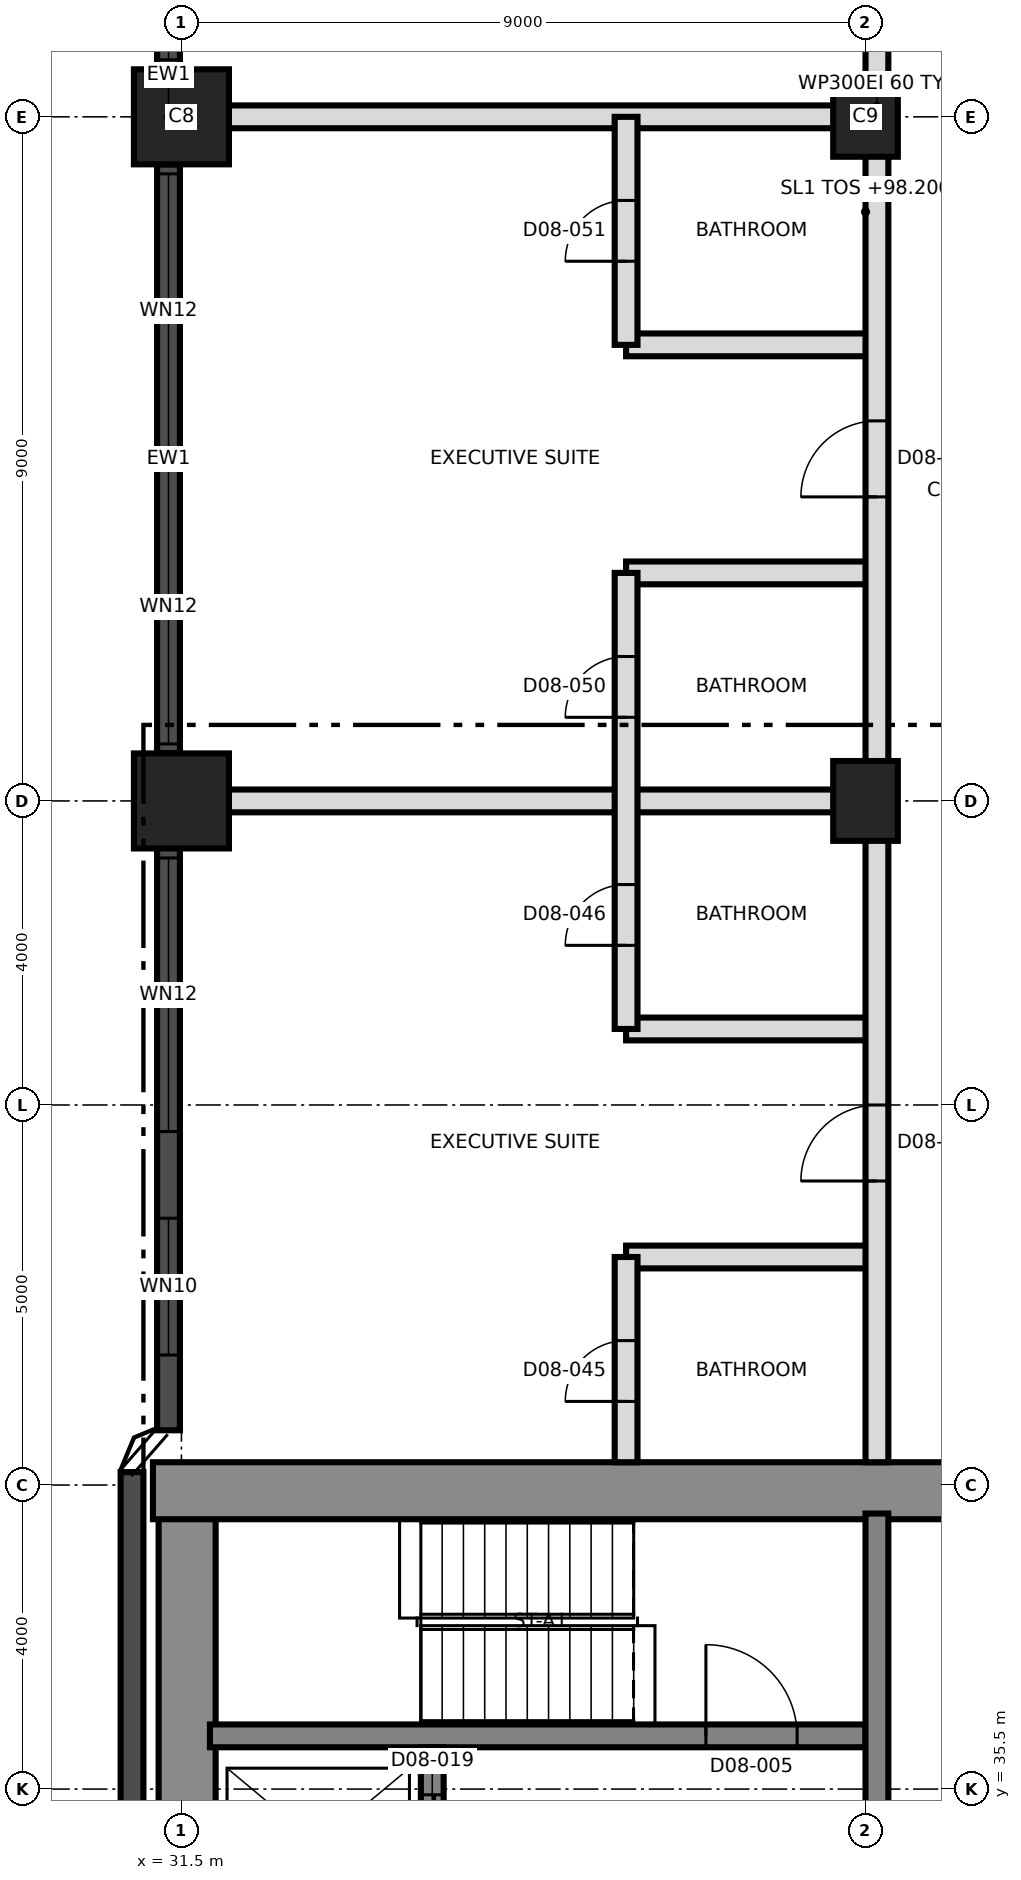
"""IFC4 building model, lengths in metres.
Left out: names, types, materials, properties, quantities, classifications, styles, units other than length and angle.
Written with IfcOpenShell. Run it as: python <this file> out.ifc"""

import sys

from ifc_helpers import new_model, si_unit, direction, frame, frame_2d, origin, origin_2d, place, context, subcontext, project, spatial, rectangle, extrude, element, fill, save


model = new_model("IFC4")
c1 = context("Model", 3, precision=1e-05, world=origin(), true_north=direction((0.0, 1.0)))
c2 = subcontext(c1, "Body", "Model", "MODEL_VIEW")
j1 = project(units=[si_unit("LENGTHUNIT", "METRE"), si_unit("PLANEANGLEUNIT", "RADIAN")], contexts=[c1])
p1 = place(None, origin())
s1 = spatial("IfcSite", under=j1, at=p1, CompositionType="ELEMENT")
p2 = place(p1, origin())
s2 = spatial("IfcBuilding", under=s1, at=p2, CompositionType="ELEMENT")
p3 = place(p2, frame((0.0, 0.0, 98.2)))
s3 = spatial("IfcBuildingStorey", under=s2, at=p3, CompositionType="ELEMENT", Elevation=98.2)
p4 = place(p3, frame((31.575, 21.875, 0.0), z_axis=(0.0, 0.0, 1.0), x_axis=(0.0, 1.0, 0.0)))
e1 = element("IfcWall", 1, at=p4, inside=s3, PredefinedType="SHEAR", context=c2, shape_type="SweptSolid", body=[
    extrude(rectangle(XDim=17.25, YDim=0.75, at=frame_2d((8.625, 0.0))), origin(), (0.0, 0.0, 1.0), 3.7),
])
p5 = place(p3, frame((31.125, 39.425, 0.0), z_axis=(0.0, 0.0, 1.0), x_axis=(1.0, 0.0, 0.0)))
e2 = element("IfcWall", 2, at=p5, inside=s3, PredefinedType="SHEAR", context=c2, shape_type="SweptSolid", body=[
    extrude(rectangle(XDim=27.0, YDim=0.75, at=frame_2d((13.5, 0.0))), origin(), (0.0, 0.0, 1.0), 3.7),
])
p6 = place(p5, frame((10.575, 0.0, 0.0)))
e3 = element("IfcOpeningElement", 3, at=p6, cuts=e2, PredefinedType="OPENING", context=c2, shape_type="SweptSolid", body=[
    extrude(rectangle(XDim=1.2, YDim=2.1, at=frame_2d((0.6, 1.05))), frame((0.0, 0.385, 0.0), z_axis=(0.0, -1.0, 0.0), x_axis=(1.0, 0.0, 0.0)), (0.0, 0.0, 1.0), 0.77),
])
p7 = place(p3, frame((31.875, 36.2, 0.0), z_axis=(0.0, 0.0, 1.0), x_axis=(1.0, 0.0, 0.0)))
e4 = element("IfcWall", 4, at=p7, inside=s3, PredefinedType="SHEAR", context=c2, shape_type="SweptSolid", body=[
    extrude(rectangle(XDim=8.625, YDim=0.3, at=frame_2d((4.312, 0.0))), origin(), (0.0, 0.0, 1.0), 3.7),
])
p8 = place(p7, frame((6.525, 0.0, 0.0)))
e5 = element("IfcOpeningElement", 5, at=p8, cuts=e4, PredefinedType="OPENING", context=c2, shape_type="SweptSolid", body=[
    extrude(rectangle(XDim=1.2, YDim=2.1, at=frame_2d((0.6, 1.05))), frame((0.0, 0.16, 0.0), z_axis=(0.0, -1.0, 0.0), x_axis=(1.0, 0.0, 0.0)), (0.0, 0.0, 1.0), 0.32),
])
p9 = place(p3, frame((40.65, 33.5, 0.0), z_axis=(0.0, 0.0, 1.0), x_axis=(0.0, 1.0, 0.0)))
e6 = element("IfcWall", 6, at=p9, inside=s3, PredefinedType="SHEAR", context=c2, shape_type="SweptSolid", body=[
    extrude(rectangle(XDim=5.625, YDim=0.3, at=frame_2d((2.812, 0.0))), origin(), (0.0, 0.0, 1.0), 3.7),
])
p10 = place(p3, frame((34.8, 33.5, 0.0), z_axis=(0.0, 0.0, 1.0), x_axis=(0.0, 1.0, 0.0)))
e7 = element("IfcWall", 7, at=p10, inside=s3, PredefinedType="SHEAR", context=c2, shape_type="SweptSolid", body=[
    extrude(rectangle(XDim=2.55, YDim=0.3, at=frame_2d((1.275, 0.0))), origin(), (0.0, 0.0, 1.0), 3.7),
])
p11 = place(p10, frame((0.625, 0.0, 0.0)))
e8 = element("IfcOpeningElement", 8, at=p11, cuts=e7, PredefinedType="OPENING", context=c2, shape_type="SweptSolid", body=[
    extrude(rectangle(XDim=1.3, YDim=2.4, at=frame_2d((0.65, 1.2))), frame((0.0, 0.16, 0.0), z_axis=(0.0, -1.0, 0.0), x_axis=(1.0, 0.0, 0.0)), (0.0, 0.0, 1.0), 0.32),
])
p12 = place(p3, frame((31.5, 48.5, 0.0), z_axis=(0.0, 0.0, 1.0), x_axis=(1.0, 0.0, 0.0)))
e9 = element("IfcColumn", 9, at=p12, inside=s3, PredefinedType="COLUMN", context=c2, shape_type="SweptSolid", body=[
    extrude(rectangle(XDim=1.25, YDim=1.25, at=origin_2d()), origin(), (0.0, 0.0, 1.0), 3.7),
])
p13 = place(p3, frame((40.5, 48.5, 0.0), z_axis=(0.0, 0.0, 1.0), x_axis=(0.0, 1.0, 0.0)))
e10 = element("IfcColumn", 10, at=p13, inside=s3, PredefinedType="COLUMN", context=c2, shape_type="SweptSolid", body=[
    extrude(rectangle(XDim=1.05, YDim=0.85, at=origin_2d()), origin(), (0.0, 0.0, 1.0), 3.7),
])
p14 = place(p3, frame((31.5, 57.5, 0.0), z_axis=(0.0, 0.0, 1.0), x_axis=(1.0, 0.0, 0.0)))
e11 = element("IfcColumn", 11, at=p14, inside=s3, PredefinedType="COLUMN", context=c2, shape_type="SweptSolid", body=[
    extrude(rectangle(XDim=1.25, YDim=1.25, at=origin_2d()), origin(), (0.0, 0.0, 1.0), 3.7),
])
p15 = place(p3, frame((40.5, 57.5, 0.0), z_axis=(0.0, 0.0, 1.0), x_axis=(0.0, 1.0, 0.0)))
e12 = element("IfcColumn", 12, at=p15, inside=s3, PredefinedType="COLUMN", context=c2, shape_type="SweptSolid", body=[
    extrude(rectangle(XDim=1.05, YDim=0.85, at=origin_2d()), origin(), (0.0, 0.0, 1.0), 3.7),
])
p16 = place(p3, frame((31.33, 65.875, 0.0), z_axis=(0.0, 0.0, 1.0), x_axis=(0.0, -1.0, 0.0)))
e13 = element("IfcWall", 13, at=p16, inside=s3, PredefinedType="SOLIDWALL", context=c2, shape_type="SweptSolid", body=[
    extrude(rectangle(XDim=7.75, YDim=0.3, at=frame_2d((3.875, 0.0))), origin(), (0.0, 0.0, 1.0), 2.75),
])
p17 = place(p16, frame((4.025, 0.0, 0.9)))
e14 = element("IfcOpeningElement", 14, at=p17, cuts=e13, PredefinedType="OPENING", context=c2, shape_type="SweptSolid", body=[
    extrude(rectangle(XDim=3.6, YDim=1.5, at=frame_2d((1.8, 0.75))), frame((0.0, 0.16, 0.0), z_axis=(0.0, -1.0, 0.0), x_axis=(1.0, 0.0, 0.0)), (0.0, 0.0, 1.0), 0.32),
])
p18 = place(p3, frame((31.33, 58.125, 0.0), z_axis=(0.0, 0.0, 1.0), x_axis=(0.0, -1.0, 0.0)))
e15 = element("IfcWall", 15, at=p18, inside=s3, PredefinedType="SOLIDWALL", context=c2, shape_type="SweptSolid", body=[
    extrude(rectangle(XDim=1.25, YDim=0.3, at=frame_2d((0.625, 0.0))), origin(), (0.0, 0.0, 1.0), 3.4),
])
p19 = place(p3, frame((31.33, 56.875, 0.0), z_axis=(0.0, 0.0, 1.0), x_axis=(0.0, -1.0, 0.0)))
e16 = element("IfcWall", 16, at=p19, inside=s3, PredefinedType="SOLIDWALL", context=c2, shape_type="SweptSolid", body=[
    extrude(rectangle(XDim=7.75, YDim=0.3, at=frame_2d((3.875, 0.0))), origin(), (0.0, 0.0, 1.0), 2.75),
])
p20 = place(p19, frame((0.125, 0.0, 0.9)))
e17 = element("IfcOpeningElement", 17, at=p20, cuts=e16, PredefinedType="OPENING", context=c2, shape_type="SweptSolid", body=[
    extrude(rectangle(XDim=3.6, YDim=1.5, at=frame_2d((1.8, 0.75))), frame((0.0, 0.16, 0.0), z_axis=(0.0, -1.0, 0.0), x_axis=(1.0, 0.0, 0.0)), (0.0, 0.0, 1.0), 0.32),
])
p21 = place(p19, frame((4.025, 0.0, 0.9)))
e18 = element("IfcOpeningElement", 18, at=p21, cuts=e16, PredefinedType="OPENING", context=c2, shape_type="SweptSolid", body=[
    extrude(rectangle(XDim=3.6, YDim=1.5, at=frame_2d((1.8, 0.75))), frame((0.0, 0.16, 0.0), z_axis=(0.0, -1.0, 0.0), x_axis=(1.0, 0.0, 0.0)), (0.0, 0.0, 1.0), 0.32),
])
p22 = place(p3, frame((31.33, 49.125, 0.0), z_axis=(0.0, 0.0, 1.0), x_axis=(0.0, -1.0, 0.0)))
e19 = element("IfcWall", 19, at=p22, inside=s3, PredefinedType="SOLIDWALL", context=c2, shape_type="SweptSolid", body=[
    extrude(rectangle(XDim=8.905, YDim=0.3, at=frame_2d((4.452, 0.0))), origin(), (0.0, 0.0, 1.0), 3.4),
])
p23 = place(p22, frame((1.375, 0.0, 0.9)))
e20 = element("IfcOpeningElement", 20, at=p23, cuts=e19, PredefinedType="OPENING", context=c2, shape_type="SweptSolid", body=[
    extrude(rectangle(XDim=3.6, YDim=1.5, at=frame_2d((1.8, 0.75))), frame((0.0, 0.16, 0.0), z_axis=(0.0, -1.0, 0.0), x_axis=(1.0, 0.0, 0.0)), (0.0, 0.0, 1.0), 0.32),
])
p24 = place(p22, frame((6.115, 0.0, 0.3)))
e21 = element("IfcOpeningElement", 21, at=p24, cuts=e19, PredefinedType="OPENING", context=c2, shape_type="SweptSolid", body=[
    extrude(rectangle(XDim=1.8, YDim=2.4, at=frame_2d((0.9, 1.2))), frame((0.0, 0.16, 0.0), z_axis=(0.0, -1.0, 0.0), x_axis=(1.0, 0.0, 0.0)), (0.0, 0.0, 1.0), 0.32),
])
p25 = place(p3, frame((30.85, 39.67, 0.0), z_axis=(0.0, 0.0, 1.0), x_axis=(0.0, -1.0, 0.0)))
e22 = element("IfcWall", 22, at=p25, inside=s3, PredefinedType="SOLIDWALL", context=c2, shape_type="SweptSolid", body=[
    extrude(rectangle(XDim=18.31, YDim=0.3, at=frame_2d((9.155, 0.0))), origin(), (0.0, 0.0, 1.0), 3.4),
])
for number, where, z_axis, x_axis in (
    (23, (37.35, 42.5, 0.0), (0.0, 0.0, 1.0), (1.0, 0.0, 0.0)),
    (24, (37.35, 45.5, 0.0), (0.0, 0.0, 1.0), (1.0, 0.0, 0.0)),
):
    element("IfcWall", number, at=place(p3, frame(where, z_axis=z_axis, x_axis=x_axis)), inside=s3, PredefinedType="PARTITIONING", context=c2, shape_type="SweptSolid", body=[
        extrude(rectangle(XDim=3.3, YDim=0.3, at=frame_2d((1.65, 0.0))), origin(), (0.0, 0.0, 1.0), 3.4),
    ])
p26 = place(p3, frame((31.53, 48.5, 0.0), z_axis=(0.0, 0.0, 1.0), x_axis=(1.0, 0.0, 0.0)))
e25 = element("IfcWall", 25, at=p26, inside=s3, PredefinedType="PARTITIONING", context=c2, shape_type="SweptSolid", body=[
    extrude(rectangle(XDim=9.12, YDim=0.3, at=frame_2d((4.56, 0.0))), origin(), (0.0, 0.0, 1.0), 3.4),
])
for number, where, z_axis, x_axis in (
    (26, (37.35, 51.5, 0.0), (0.0, 0.0, 1.0), (1.0, 0.0, 0.0)),
    (27, (37.35, 54.5, 0.0), (0.0, 0.0, 1.0), (1.0, 0.0, 0.0)),
):
    element("IfcWall", number, at=place(p3, frame(where, z_axis=z_axis, x_axis=x_axis)), inside=s3, PredefinedType="PARTITIONING", context=c2, shape_type="SweptSolid", body=[
        extrude(rectangle(XDim=3.3, YDim=0.3, at=frame_2d((1.65, 0.0))), origin(), (0.0, 0.0, 1.0), 3.4),
    ])
p27 = place(p3, frame((31.53, 57.5, 0.0), z_axis=(0.0, 0.0, 1.0), x_axis=(1.0, 0.0, 0.0)))
e28 = element("IfcWall", 28, at=p27, inside=s3, PredefinedType="PARTITIONING", context=c2, shape_type="SweptSolid", body=[
    extrude(rectangle(XDim=9.12, YDim=0.3, at=frame_2d((4.56, 0.0))), origin(), (0.0, 0.0, 1.0), 3.4),
])
p28 = place(p3, frame((37.35, 39.8, 0.0), z_axis=(0.0, 0.0, 1.0), x_axis=(0.0, 1.0, 0.0)))
e29 = element("IfcWall", 29, at=p28, inside=s3, PredefinedType="PARTITIONING", context=c2, shape_type="SweptSolid", body=[
    extrude(rectangle(XDim=2.7, YDim=0.3, at=frame_2d((1.35, 0.0))), origin(), (0.0, 0.0, 1.0), 3.4),
])
p29 = place(p28, frame((0.8, 0.0, 0.0)))
e30 = element("IfcOpeningElement", 30, at=p29, cuts=e29, PredefinedType="OPENING", context=c2, shape_type="SweptSolid", body=[
    extrude(rectangle(XDim=0.8, YDim=2.1, at=frame_2d((0.4, 1.05))), frame((0.0, 0.16, 0.0), z_axis=(0.0, -1.0, 0.0), x_axis=(1.0, 0.0, 0.0)), (0.0, 0.0, 1.0), 0.32),
])
p30 = place(p3, frame((37.35, 45.5, 0.0), z_axis=(0.0, 0.0, 1.0), x_axis=(0.0, 1.0, 0.0)))
e31 = element("IfcWall", 31, at=p30, inside=s3, PredefinedType="PARTITIONING", context=c2, shape_type="SweptSolid", body=[
    extrude(rectangle(XDim=6.0, YDim=0.3, at=frame_2d((3.0, 0.0))), origin(), (0.0, 0.0, 1.0), 3.4),
])
p31 = place(p30, frame((1.1, 0.0, 0.0)))
e32 = element("IfcOpeningElement", 32, at=p31, cuts=e31, PredefinedType="OPENING", context=c2, shape_type="SweptSolid", body=[
    extrude(rectangle(XDim=0.8, YDim=2.1, at=frame_2d((0.4, 1.05))), frame((0.0, 0.16, 0.0), z_axis=(0.0, -1.0, 0.0), x_axis=(1.0, 0.0, 0.0)), (0.0, 0.0, 1.0), 0.32),
])
p32 = place(p30, frame((4.1, 0.0, 0.0)))
e33 = element("IfcOpeningElement", 33, at=p32, cuts=e31, PredefinedType="OPENING", context=c2, shape_type="SweptSolid", body=[
    extrude(rectangle(XDim=0.8, YDim=2.1, at=frame_2d((0.4, 1.05))), frame((0.0, 0.16, 0.0), z_axis=(0.0, -1.0, 0.0), x_axis=(1.0, 0.0, 0.0)), (0.0, 0.0, 1.0), 0.32),
])
p33 = place(p3, frame((37.35, 54.5, 0.0), z_axis=(0.0, 0.0, 1.0), x_axis=(0.0, 1.0, 0.0)))
e34 = element("IfcWall", 34, at=p33, inside=s3, PredefinedType="PARTITIONING", context=c2, shape_type="SweptSolid", body=[
    extrude(rectangle(XDim=3.0, YDim=0.3, at=frame_2d((1.5, 0.0))), origin(), (0.0, 0.0, 1.0), 3.4),
])
p34 = place(p33, frame((1.1, 0.0, 0.0)))
e35 = element("IfcOpeningElement", 35, at=p34, cuts=e34, PredefinedType="OPENING", context=c2, shape_type="SweptSolid", body=[
    extrude(rectangle(XDim=0.8, YDim=2.1, at=frame_2d((0.4, 1.05))), frame((0.0, 0.16, 0.0), z_axis=(0.0, -1.0, 0.0), x_axis=(1.0, 0.0, 0.0)), (0.0, 0.0, 1.0), 0.32),
])
p35 = place(p3, frame((40.65, 39.8, 0.0), z_axis=(0.0, 0.0, 1.0), x_axis=(0.0, 1.0, 0.0)))
e36 = element("IfcWall", 36, at=p35, inside=s3, PredefinedType="PARTITIONING", context=c2, shape_type="SweptSolid", body=[
    extrude(rectangle(XDim=35.67, YDim=0.3, at=frame_2d((17.835, 0.0))), origin(), (0.0, 0.0, 1.0), 3.4),
])
p36 = place(p35, frame((3.7, 0.0, 0.0)))
e37 = element("IfcOpeningElement", 37, at=p36, cuts=e36, PredefinedType="OPENING", context=c2, shape_type="SweptSolid", body=[
    extrude(rectangle(XDim=1.0, YDim=2.4, at=frame_2d((0.5, 1.2))), frame((0.0, 0.16, 0.0), z_axis=(0.0, -1.0, 0.0), x_axis=(1.0, 0.0, 0.0)), (0.0, 0.0, 1.0), 0.32),
])
p37 = place(p35, frame((12.7, 0.0, 0.0)))
e38 = element("IfcOpeningElement", 38, at=p37, cuts=e36, PredefinedType="OPENING", context=c2, shape_type="SweptSolid", body=[
    extrude(rectangle(XDim=1.0, YDim=2.4, at=frame_2d((0.5, 1.2))), frame((0.0, 0.16, 0.0), z_axis=(0.0, -1.0, 0.0), x_axis=(1.0, 0.0, 0.0)), (0.0, 0.0, 1.0), 0.32),
])
p38 = place(p35, frame((21.2, 0.0, 0.0)))
e39 = element("IfcOpeningElement", 39, at=p38, cuts=e36, PredefinedType="OPENING", context=c2, shape_type="SweptSolid", body=[
    extrude(rectangle(XDim=1.0, YDim=2.4, at=frame_2d((0.5, 1.2))), frame((0.0, 0.16, 0.0), z_axis=(0.0, -1.0, 0.0), x_axis=(1.0, 0.0, 0.0)), (0.0, 0.0, 1.0), 0.32),
])
p39 = place(p17, origin())
e40 = element("IfcWindow", 40, at=p39, inside=s3, PartitioningType="SINGLE_PANEL", PredefinedType="WINDOW", context=c2, shape_type="SweptSolid", body=[
    extrude(rectangle(XDim=3.6, YDim=1.5, at=frame_2d((1.8, 0.75))), frame((0.0, 0.03, 0.0), z_axis=(0.0, -1.0, 0.0), x_axis=(1.0, 0.0, 0.0)), (0.0, 0.0, 1.0), 0.06),
])
fill(e14, e40)
p40 = place(p20, origin())
e41 = element("IfcWindow", 41, at=p40, inside=s3, PartitioningType="SINGLE_PANEL", PredefinedType="WINDOW", context=c2, shape_type="SweptSolid", body=[
    extrude(rectangle(XDim=3.6, YDim=1.5, at=frame_2d((1.8, 0.75))), frame((0.0, 0.03, 0.0), z_axis=(0.0, -1.0, 0.0), x_axis=(1.0, 0.0, 0.0)), (0.0, 0.0, 1.0), 0.06),
])
fill(e17, e41)
p41 = place(p21, origin())
e42 = element("IfcWindow", 42, at=p41, inside=s3, PartitioningType="SINGLE_PANEL", PredefinedType="WINDOW", context=c2, shape_type="SweptSolid", body=[
    extrude(rectangle(XDim=3.6, YDim=1.5, at=frame_2d((1.8, 0.75))), frame((0.0, 0.03, 0.0), z_axis=(0.0, -1.0, 0.0), x_axis=(1.0, 0.0, 0.0)), (0.0, 0.0, 1.0), 0.06),
])
fill(e18, e42)
p42 = place(p23, origin())
e43 = element("IfcWindow", 43, at=p42, inside=s3, PartitioningType="SINGLE_PANEL", PredefinedType="WINDOW", context=c2, shape_type="SweptSolid", body=[
    extrude(rectangle(XDim=3.6, YDim=1.5, at=frame_2d((1.8, 0.75))), frame((0.0, 0.03, 0.0), z_axis=(0.0, -1.0, 0.0), x_axis=(1.0, 0.0, 0.0)), (0.0, 0.0, 1.0), 0.06),
])
fill(e20, e43)
p43 = place(p24, origin())
e44 = element("IfcWindow", 44, at=p43, inside=s3, PartitioningType="SINGLE_PANEL", PredefinedType="WINDOW", context=c2, shape_type="SweptSolid", body=[
    extrude(rectangle(XDim=1.8, YDim=2.4, at=frame_2d((0.9, 1.2))), frame((0.0, 0.03, 0.0), z_axis=(0.0, -1.0, 0.0), x_axis=(1.0, 0.0, 0.0)), (0.0, 0.0, 1.0), 0.06),
])
fill(e21, e44)
p44 = place(p8, origin())
e45 = element("IfcDoor", 45, at=p44, inside=s3, OperationType="SINGLE_SWING_RIGHT", PredefinedType="DOOR", context=c2, shape_type="SweptSolid", body=[
    extrude(rectangle(XDim=1.2, YDim=2.1, at=frame_2d((0.6, 1.05))), frame((0.0, 0.025, 0.0), z_axis=(0.0, -1.0, 0.0), x_axis=(1.0, 0.0, 0.0)), (0.0, 0.0, 1.0), 0.05),
])
fill(e5, e45)
p45 = place(p11, origin())
e46 = element("IfcDoor", 46, at=p45, inside=s3, OperationType="SLIDING_TO_LEFT", PredefinedType="DOOR", context=c2, shape_type="SweptSolid", body=[
    extrude(rectangle(XDim=1.3, YDim=2.4, at=frame_2d((0.65, 1.2))), frame((0.0, 0.025, 0.0), z_axis=(0.0, -1.0, 0.0), x_axis=(1.0, 0.0, 0.0)), (0.0, 0.0, 1.0), 0.05),
])
fill(e8, e46)
p46 = place(p29, origin())
e47 = element("IfcDoor", 47, at=p46, inside=s3, OperationType="SINGLE_SWING_LEFT", PredefinedType="DOOR", context=c2, shape_type="SweptSolid", body=[
    extrude(rectangle(XDim=0.8, YDim=2.1, at=frame_2d((0.4, 1.05))), frame((0.0, 0.025, 0.0), z_axis=(0.0, -1.0, 0.0), x_axis=(1.0, 0.0, 0.0)), (0.0, 0.0, 1.0), 0.05),
])
fill(e30, e47)
p47 = place(p31, origin())
e48 = element("IfcDoor", 48, at=p47, inside=s3, OperationType="SINGLE_SWING_LEFT", PredefinedType="DOOR", context=c2, shape_type="SweptSolid", body=[
    extrude(rectangle(XDim=0.8, YDim=2.1, at=frame_2d((0.4, 1.05))), frame((0.0, 0.025, 0.0), z_axis=(0.0, -1.0, 0.0), x_axis=(1.0, 0.0, 0.0)), (0.0, 0.0, 1.0), 0.05),
])
fill(e32, e48)
p48 = place(p36, origin())
e49 = element("IfcDoor", 49, at=p48, inside=s3, OperationType="SINGLE_SWING_RIGHT", PredefinedType="DOOR", context=c2, shape_type="SweptSolid", body=[
    extrude(rectangle(XDim=1.0, YDim=2.4, at=frame_2d((0.5, 1.2))), frame((0.0, 0.025, 0.0), z_axis=(0.0, -1.0, 0.0), x_axis=(1.0, 0.0, 0.0)), (0.0, 0.0, 1.0), 0.05),
])
fill(e37, e49)
p49 = place(p32, origin())
e50 = element("IfcDoor", 50, at=p49, inside=s3, OperationType="SINGLE_SWING_RIGHT", PredefinedType="DOOR", context=c2, shape_type="SweptSolid", body=[
    extrude(rectangle(XDim=0.8, YDim=2.1, at=frame_2d((0.4, 1.05))), frame((0.0, 0.025, 0.0), z_axis=(0.0, -1.0, 0.0), x_axis=(1.0, 0.0, 0.0)), (0.0, 0.0, 1.0), 0.05),
])
fill(e33, e50)
p50 = place(p34, origin())
e51 = element("IfcDoor", 51, at=p50, inside=s3, OperationType="SINGLE_SWING_LEFT", PredefinedType="DOOR", context=c2, shape_type="SweptSolid", body=[
    extrude(rectangle(XDim=0.8, YDim=2.1, at=frame_2d((0.4, 1.05))), frame((0.0, 0.025, 0.0), z_axis=(0.0, -1.0, 0.0), x_axis=(1.0, 0.0, 0.0)), (0.0, 0.0, 1.0), 0.05),
])
fill(e35, e51)
p51 = place(p37, origin())
e52 = element("IfcDoor", 52, at=p51, inside=s3, OperationType="SINGLE_SWING_LEFT", PredefinedType="DOOR", context=c2, shape_type="SweptSolid", body=[
    extrude(rectangle(XDim=1.0, YDim=2.4, at=frame_2d((0.5, 1.2))), frame((0.0, 0.025, 0.0), z_axis=(0.0, -1.0, 0.0), x_axis=(1.0, 0.0, 0.0)), (0.0, 0.0, 1.0), 0.05),
])
fill(e38, e52)
save(model, sys.argv[1])
